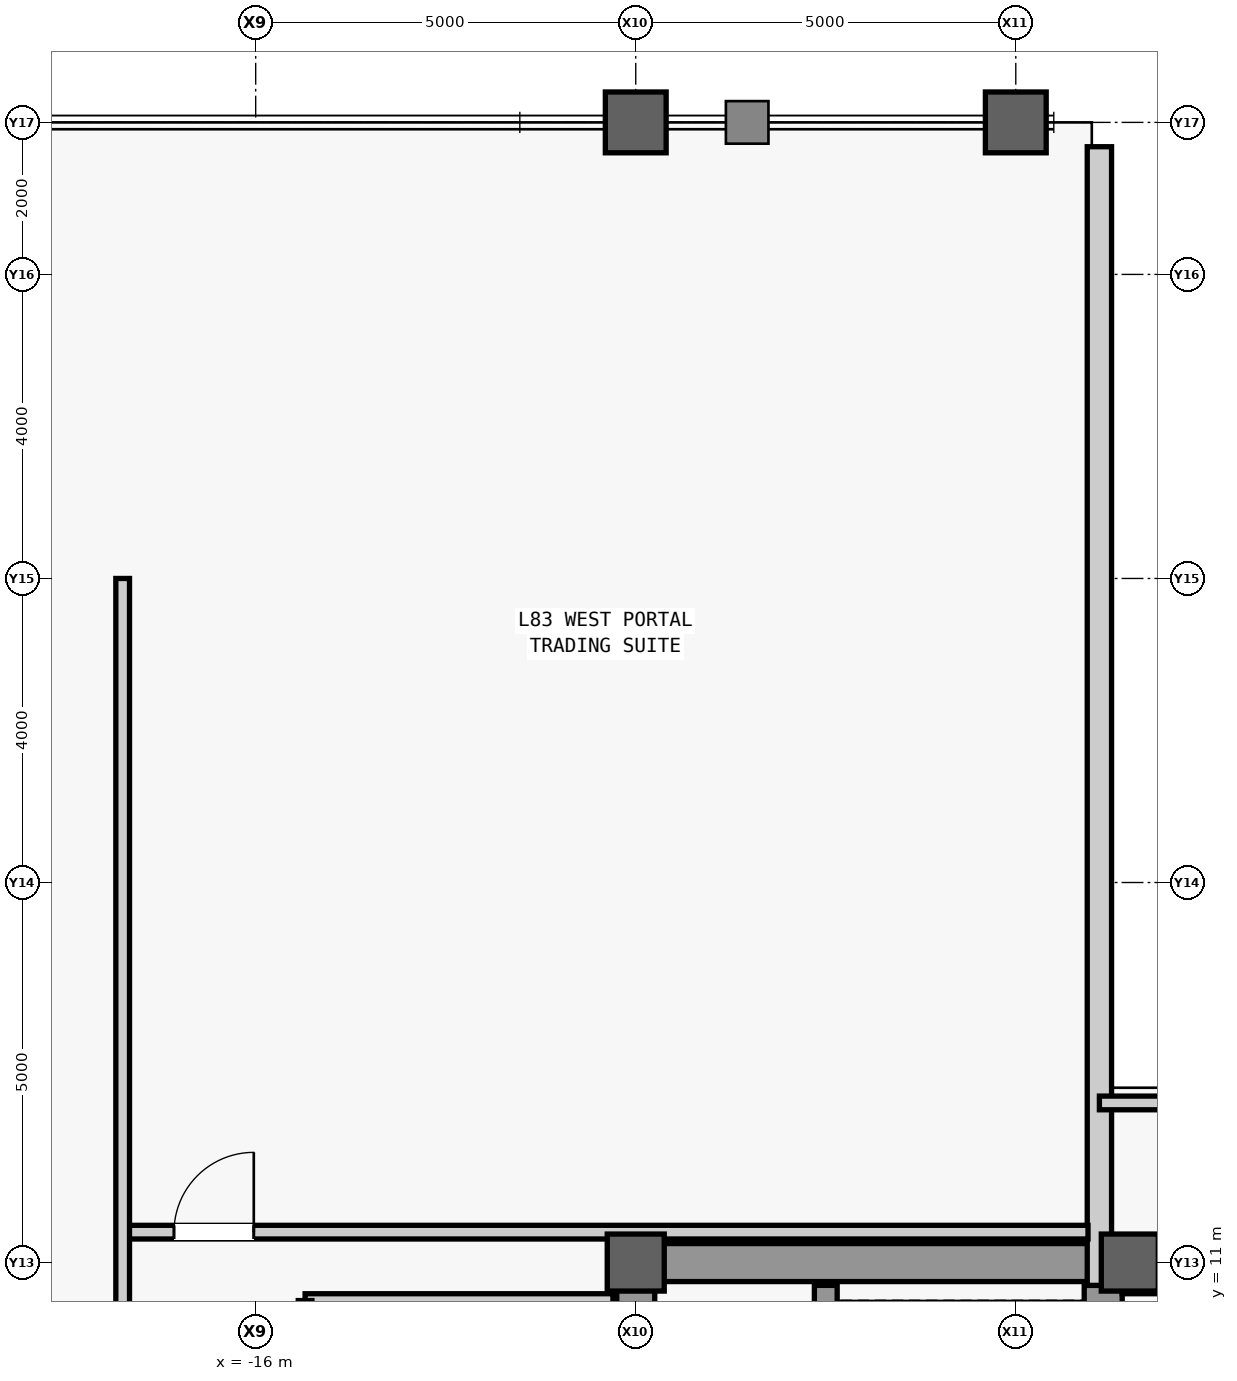
"""IFC4 building model, lengths in metres.
Left out: names, types, materials, properties, quantities, classifications, styles, units other than length and angle.
Written with IfcOpenShell. Run it as: python <this file> out.ifc"""

import sys

from ifc_helpers import new_model, si_unit, direction, frame, frame_2d, origin, origin_2d, place, context, subcontext, project, spatial, rectangle, hollow_rectangle, extrude, source, transform, mapped, element, fill, save


model = new_model("IFC4")
c1 = context("Model", 3, precision=1e-05, world=origin(), true_north=direction((0.0, 1.0)))
c2 = subcontext(c1, "Body", "Model", "MODEL_VIEW")
j1 = project(units=[si_unit("LENGTHUNIT", "METRE"), si_unit("PLANEANGLEUNIT", "RADIAN")], contexts=[c1])
p1 = place(None, origin())
s1 = spatial("IfcSite", under=j1, at=p1, CompositionType="ELEMENT")
p2 = place(p1, origin())
s2 = spatial("IfcBuilding", under=s1, at=p2, CompositionType="ELEMENT")
p3 = place(p2, frame((0.0, 0.0, 350.3)))
s3 = spatial("IfcBuildingStorey", under=s2, at=p3, CompositionType="ELEMENT", Elevation=350.3)
m1 = source(origin(), c2, "Body", "SweptSolid", [
    extrude(rectangle(XDim=22.0, YDim=0.5, at=frame_2d((11.0, 0.0))), origin(), (0.0, 0.0, 1.0), 3.74),
])
p4 = place(p3, frame((-11.0, -11.0, 0.0), z_axis=(0.0, 0.0, 1.0), x_axis=(0.0, 1.0, 0.0)))
e1 = element("IfcWall", 1, at=p4, inside=s3, PredefinedType="SHEAR", context=c2, shape_type="MappedRepresentation", body=[
    mapped(m1, transform((0.0, 0.0, 0.0), scale=1.0)),
])
m2 = source(origin(), c2, "Body", "SweptSolid", [
    extrude(rectangle(XDim=1.1, YDim=2.2, at=frame_2d((0.55, 1.1))), frame((0.0, 0.26, 0.0), z_axis=(0.0, -1.0, 0.0), x_axis=(1.0, 0.0, 0.0)), (0.0, 0.0, 1.0), 0.52),
])
p5 = place(p4, frame((0.8, 0.0, 0.0)))
e2 = element("IfcOpeningElement", 2, at=p5, cuts=e1, PredefinedType="OPENING", context=c2, shape_type="MappedRepresentation", body=[
    mapped(m2, transform((0.0, 0.0, 0.0), scale=1.0)),
])
p6 = place(p4, frame((12.5, 0.0, 0.0)))
e3 = element("IfcOpeningElement", 3, at=p6, cuts=e1, PredefinedType="OPENING", context=c2, shape_type="MappedRepresentation", body=[
    mapped(m2, transform((0.0, 0.0, 0.0), scale=1.0)),
])
m3 = source(origin(), c2, "Body", "SweptSolid", [
    extrude(rectangle(XDim=0.9, YDim=2.15, at=frame_2d((0.45, 1.075))), frame((0.0, 0.26, 0.0), z_axis=(0.0, -1.0, 0.0), x_axis=(1.0, 0.0, 0.0)), (0.0, 0.0, 1.0), 0.52),
])
p7 = place(p4, frame((6.2, 0.0, 0.0)))
e4 = element("IfcOpeningElement", 4, at=p7, cuts=e1, PredefinedType="OPENING", context=c2, shape_type="MappedRepresentation", body=[
    mapped(m3, transform((0.0, 0.0, 0.0), scale=1.0)),
])
p8 = place(p4, frame((8.05, 0.0, 0.0)))
e5 = element("IfcOpeningElement", 5, at=p8, cuts=e1, PredefinedType="OPENING", context=c2, shape_type="MappedRepresentation", body=[
    mapped(m3, transform((0.0, 0.0, 0.0), scale=1.0)),
])
m4 = source(origin(), c2, "Body", "SweptSolid", [
    extrude(rectangle(XDim=1.2, YDim=2.3, at=frame_2d((0.6, 1.15))), frame((0.0, 0.26, 0.0), z_axis=(0.0, -1.0, 0.0), x_axis=(1.0, 0.0, 0.0)), (0.0, 0.0, 1.0), 0.52),
])
p9 = place(p4, frame((14.6, 0.0, 0.0)))
e6 = element("IfcOpeningElement", 6, at=p9, cuts=e1, PredefinedType="OPENING", context=c2, shape_type="MappedRepresentation", body=[
    mapped(m4, transform((0.0, 0.0, 0.0), scale=1.0)),
])
p10 = place(p4, frame((18.2, 0.0, 0.0)))
e7 = element("IfcOpeningElement", 7, at=p10, cuts=e1, PredefinedType="OPENING", context=c2, shape_type="MappedRepresentation", body=[
    mapped(m4, transform((0.0, 0.0, 0.0), scale=1.0)),
])
m5 = source(origin(), c2, "Body", "SweptSolid", [
    extrude(rectangle(XDim=1.3, YDim=2.3, at=frame_2d((0.65, 1.15))), frame((0.0, 0.26, 0.0), z_axis=(0.0, -1.0, 0.0), x_axis=(1.0, 0.0, 0.0)), (0.0, 0.0, 1.0), 0.52),
])
p11 = place(p4, frame((2.7, 0.0, 0.0)))
e8 = element("IfcOpeningElement", 8, at=p11, cuts=e1, PredefinedType="OPENING", context=c2, shape_type="MappedRepresentation", body=[
    mapped(m5, transform((0.0, 0.0, 0.0), scale=1.0)),
])
m6 = source(origin(), c2, "Body", "SweptSolid", [
    extrude(rectangle(XDim=21.4, YDim=0.5, at=frame_2d((10.7, 0.0))), origin(), (0.0, 0.0, 1.0), 3.74),
])
p12 = place(p3, frame((-4.85, -10.7, 0.0), z_axis=(0.0, 0.0, 1.0), x_axis=(0.0, 1.0, 0.0)))
e9 = element("IfcWall", 9, at=p12, inside=s3, PredefinedType="SHEAR", context=c2, shape_type="MappedRepresentation", body=[
    mapped(m6, transform((0.0, 0.0, 0.0), scale=1.0)),
])
m7 = source(origin(), c2, "Body", "SweptSolid", [
    extrude(rectangle(XDim=5.9, YDim=0.5, at=frame_2d((2.95, 0.0))), origin(), (0.0, 0.0, 1.0), 3.74),
])
p13 = place(p3, frame((-10.75, 11.0, 0.0), z_axis=(0.0, 0.0, 1.0), x_axis=(1.0, 0.0, 0.0)))
e10 = element("IfcWall", 10, at=p13, inside=s3, PredefinedType="SHEAR", context=c2, shape_type="MappedRepresentation", body=[
    mapped(m7, transform((0.0, 0.0, 0.0), scale=1.0)),
])
m8 = source(origin(), c2, "Body", "SweptSolid", [
    extrude(rectangle(XDim=0.75, YDim=0.75, at=origin_2d()), origin(), (0.0, 0.0, 1.0), 4.0),
])
p14 = place(p3, frame((-11.0, 11.0, 0.0), z_axis=(0.0, 0.0, 1.0), x_axis=(1.0, 0.0, 0.0)))
e11 = element("IfcColumn", 11, at=p14, inside=s3, PredefinedType="COLUMN", context=c2, shape_type="MappedRepresentation", body=[
    mapped(m8, transform((0.0, 0.0, 0.0), scale=1.0)),
])
m9 = source(origin(), c2, "Body", "SweptSolid", [
    extrude(hollow_rectangle(XDim=0.8, YDim=0.8, WallThickness=0.045, at=origin_2d()), origin(), (0.0, 0.0, 1.0), 4.0),
])
for number, where, z_axis, x_axis in (
    (12, (-11.0, 26.0, 0.0), (0.0, 0.0, 1.0), (1.0, 0.0, 0.0)),
    (13, (-6.0, 26.0, 0.0), (0.0, 0.0, 1.0), (1.0, 0.0, 0.0)),
):
    element("IfcColumn", number, at=place(p3, frame(where, z_axis=z_axis, x_axis=x_axis)), inside=s3, PredefinedType="COLUMN", context=c2, shape_type="MappedRepresentation", body=[
        mapped(m9, transform((0.0, 0.0, 0.0), scale=1.0)),
    ])
p15 = place(p3, frame((-4.5, 11.0, 0.0), z_axis=(0.0, 0.0, 1.0), x_axis=(1.0, 0.0, 0.0)))
e14 = element("IfcColumn", 14, at=p15, inside=s3, PredefinedType="COLUMN", context=c2, shape_type="MappedRepresentation", body=[
    mapped(m8, transform((0.0, 0.0, 0.0), scale=1.0)),
])
m10 = source(origin(), c2, "Body", "SweptSolid", [
    extrude(rectangle(XDim=14.98, YDim=0.32, at=frame_2d((7.49, 0.0))), origin(), (0.0, 0.0, 1.0), 3.045),
])
p16 = place(p3, frame((-4.9, 10.7, 0.0), z_axis=(0.0, 0.0, 1.0), x_axis=(0.0, 1.0, 0.0)))
e15 = element("IfcWall", 15, at=p16, inside=s3, PredefinedType="STANDARD", context=c2, shape_type="MappedRepresentation", body=[
    mapped(m10, transform((0.0, 0.0, 0.0), scale=1.0)),
])
m11 = source(origin(), c2, "Body", "SweptSolid", [
    extrude(rectangle(XDim=7.75, YDim=0.3, at=frame_2d((3.875, 0.0))), origin(), (0.0, 0.0, 1.0), 3.74),
])
p17 = place(p3, frame((-8.5, 2.95, 0.0), z_axis=(0.0, 0.0, 1.0), x_axis=(0.0, 1.0, 0.0)))
e16 = element("IfcWall", 16, at=p17, inside=s3, PredefinedType="SHEAR", context=c2, shape_type="MappedRepresentation", body=[
    mapped(m11, transform((0.0, 0.0, 0.0), scale=1.0)),
])
m12 = source(origin(), c2, "Body", "SweptSolid", [
    extrude(rectangle(XDim=4.05, YDim=0.18, at=frame_2d((2.025, 0.0))), origin(), (0.0, 0.0, 1.0), 3.74),
])
p18 = place(p3, frame((-15.35, 10.5, 0.0), z_axis=(0.0, 0.0, 1.0), x_axis=(1.0, 0.0, 0.0)))
e17 = element("IfcWall", 17, at=p18, inside=s3, PredefinedType="PARTITIONING", context=c2, shape_type="MappedRepresentation", body=[
    mapped(m12, transform((0.0, 0.0, 0.0), scale=1.0)),
])
m13 = source(origin(), c2, "Body", "SweptSolid", [
    extrude(rectangle(XDim=16.6, YDim=0.18, at=frame_2d((8.3, 0.0))), origin(), (0.0, 0.0, 1.0), 3.74),
])
p19 = place(p3, frame((-15.35, -6.1, 0.0), z_axis=(0.0, 0.0, 1.0), x_axis=(0.0, 1.0, 0.0)))
e18 = element("IfcWall", 18, at=p19, inside=s3, PredefinedType="PARTITIONING", context=c2, shape_type="MappedRepresentation", body=[
    mapped(m13, transform((0.0, 0.0, 0.0), scale=1.0)),
])
m14 = source(origin(), c2, "Body", "SweptSolid", [
    extrude(rectangle(XDim=1.8, YDim=2.25, at=frame_2d((0.9, 1.125))), frame((0.0, 0.1, 0.0), z_axis=(0.0, -1.0, 0.0), x_axis=(1.0, 0.0, 0.0)), (0.0, 0.0, 1.0), 0.2),
])
p20 = place(p19, frame((2.7, 0.0, 0.0)))
e19 = element("IfcOpeningElement", 19, at=p20, cuts=e18, PredefinedType="OPENING", context=c2, shape_type="MappedRepresentation", body=[
    mapped(m14, transform((0.0, 0.0, 0.0), scale=1.0)),
])
p21 = place(p19, frame((11.0, 0.0, 0.0)))
e20 = element("IfcOpeningElement", 20, at=p21, cuts=e18, PredefinedType="OPENING", context=c2, shape_type="MappedRepresentation", body=[
    mapped(m14, transform((0.0, 0.0, 0.0), scale=1.0)),
])
m15 = source(origin(), c2, "Body", "SweptSolid", [
    extrude(rectangle(XDim=9.2, YDim=0.22, at=frame_2d((4.6, 0.0))), origin(), (0.0, 0.0, 1.0), 3.74),
])
p22 = place(p3, frame((-4.6, 10.7, 0.0), z_axis=(0.0, 0.0, 1.0), x_axis=(1.0, 0.0, 0.0)))
e21 = element("IfcWall", 21, at=p22, inside=s3, PredefinedType="PARTITIONING", context=c2, shape_type="MappedRepresentation", body=[
    mapped(m15, transform((0.0, 0.0, 0.0), scale=1.0)),
])
m16 = source(origin(), c2, "Body", "SweptSolid", [
    extrude(rectangle(XDim=0.95, YDim=2.15, at=frame_2d((0.475, 1.075))), frame((0.0, 0.12, 0.0), z_axis=(0.0, -1.0, 0.0), x_axis=(1.0, 0.0, 0.0)), (0.0, 0.0, 1.0), 0.24),
])
p23 = place(p22, frame((1.375, 0.0, 0.0)))
e22 = element("IfcOpeningElement", 22, at=p23, cuts=e21, PredefinedType="OPENING", context=c2, shape_type="MappedRepresentation", body=[
    mapped(m16, transform((0.0, 0.0, 0.0), scale=1.0)),
])
p24 = place(p22, frame((5.975, 0.0, 0.0)))
e23 = element("IfcOpeningElement", 23, at=p24, cuts=e21, PredefinedType="OPENING", context=c2, shape_type="MappedRepresentation", body=[
    mapped(m16, transform((0.0, 0.0, 0.0), scale=1.0)),
])
m17 = source(origin(), c2, "Body", "SweptSolid", [
    extrude(rectangle(XDim=9.95, YDim=0.18, at=frame_2d((4.975, 0.0))), origin(), (0.0, 0.0, 1.0), 3.74),
])
p25 = place(p3, frame((-4.9, 13.1, 0.0), z_axis=(0.0, 0.0, 1.0), x_axis=(1.0, 0.0, 0.0)))
e24 = element("IfcWall", 24, at=p25, inside=s3, PredefinedType="PARTITIONING", context=c2, shape_type="MappedRepresentation", body=[
    mapped(m17, transform((0.0, 0.0, 0.0), scale=1.0)),
])
m18 = source(origin(), c2, "Body", "SweptSolid", [
    extrude(rectangle(XDim=12.7, YDim=0.18, at=frame_2d((6.35, 0.0))), origin(), (0.0, 0.0, 1.0), 2.79),
])
p26 = place(p3, frame((-17.75, 11.4, 0.0), z_axis=(0.0, 0.0, 1.0), x_axis=(1.0, 0.0, 0.0)))
e25 = element("IfcWall", 25, at=p26, inside=s3, PredefinedType="PARTITIONING", context=c2, shape_type="MappedRepresentation", body=[
    mapped(m18, transform((0.0, 0.0, 0.0), scale=1.0)),
])
m19 = source(origin(), c2, "Body", "SweptSolid", [
    extrude(rectangle(XDim=1.05, YDim=2.2, at=frame_2d((0.525, 1.1))), frame((0.0, 0.1, 0.0), z_axis=(0.0, -1.0, 0.0), x_axis=(1.0, 0.0, 0.0)), (0.0, 0.0, 1.0), 0.2),
])
p27 = place(p26, frame((0.675, 0.0, 0.0)))
e26 = element("IfcOpeningElement", 26, at=p27, cuts=e25, PredefinedType="OPENING", context=c2, shape_type="MappedRepresentation", body=[
    mapped(m19, transform((0.0, 0.0, 0.0), scale=1.0)),
])
m20 = source(origin(), c2, "Body", "SweptSolid", [
    extrude(rectangle(XDim=40.0, YDim=0.18, at=frame_2d((20.0, 0.0))), origin(), (0.0, 0.0, 1.0), 3.74),
])
p28 = place(p3, frame((-17.75, -20.0, 0.0), z_axis=(0.0, 0.0, 1.0), x_axis=(0.0, 1.0, 0.0)))
e27 = element("IfcWall", 27, at=p28, inside=s3, PredefinedType="PARTITIONING", context=c2, shape_type="MappedRepresentation", body=[
    mapped(m20, transform((0.0, 0.0, 0.0), scale=1.0)),
])
m21 = source(origin(), c2, "Body", "SweptSolid", [
    extrude(rectangle(XDim=0.95, YDim=2.15, at=frame_2d((0.475, 1.075))), frame((0.0, 0.1, 0.0), z_axis=(0.0, -1.0, 0.0), x_axis=(1.0, 0.0, 0.0)), (0.0, 0.0, 1.0), 0.2),
])
p29 = place(p28, frame((11.389, 0.0, 0.0)))
e28 = element("IfcOpeningElement", 28, at=p29, cuts=e27, PredefinedType="OPENING", context=c2, shape_type="MappedRepresentation", body=[
    mapped(m21, transform((0.0, 0.0, 0.0), scale=1.0)),
])
p30 = place(p28, frame((17.473, 0.0, 0.0)))
e29 = element("IfcOpeningElement", 29, at=p30, cuts=e27, PredefinedType="OPENING", context=c2, shape_type="MappedRepresentation", body=[
    mapped(m21, transform((0.0, 0.0, 0.0), scale=1.0)),
])
p31 = place(p28, frame((23.857, 0.0, 0.0)))
e30 = element("IfcOpeningElement", 30, at=p31, cuts=e27, PredefinedType="OPENING", context=c2, shape_type="MappedRepresentation", body=[
    mapped(m21, transform((0.0, 0.0, 0.0), scale=1.0)),
])
p32 = place(p28, frame((28.573, 0.0, 0.0)))
e31 = element("IfcOpeningElement", 31, at=p32, cuts=e27, PredefinedType="OPENING", context=c2, shape_type="MappedRepresentation", body=[
    mapped(m21, transform((0.0, 0.0, 0.0), scale=1.0)),
])
m22 = source(origin(), c2, "Body", "SweptSolid", [
    extrude(rectangle(XDim=1.05, YDim=2.2, at=frame_2d((0.525, 1.1))), frame((0.0, 0.025, 0.0), z_axis=(0.0, -1.0, 0.0), x_axis=(1.0, 0.0, 0.0)), (0.0, 0.0, 1.0), 0.05),
])
p33 = place(p27, origin())
e32 = element("IfcDoor", 32, at=p33, inside=s3, OperationType="SINGLE_SWING_RIGHT", PredefinedType="DOOR", context=c2, shape_type="MappedRepresentation", body=[
    mapped(m22, transform((0.0, 0.0, 0.0), scale=1.0)),
])
fill(e26, e32)
save(model, sys.argv[1])
